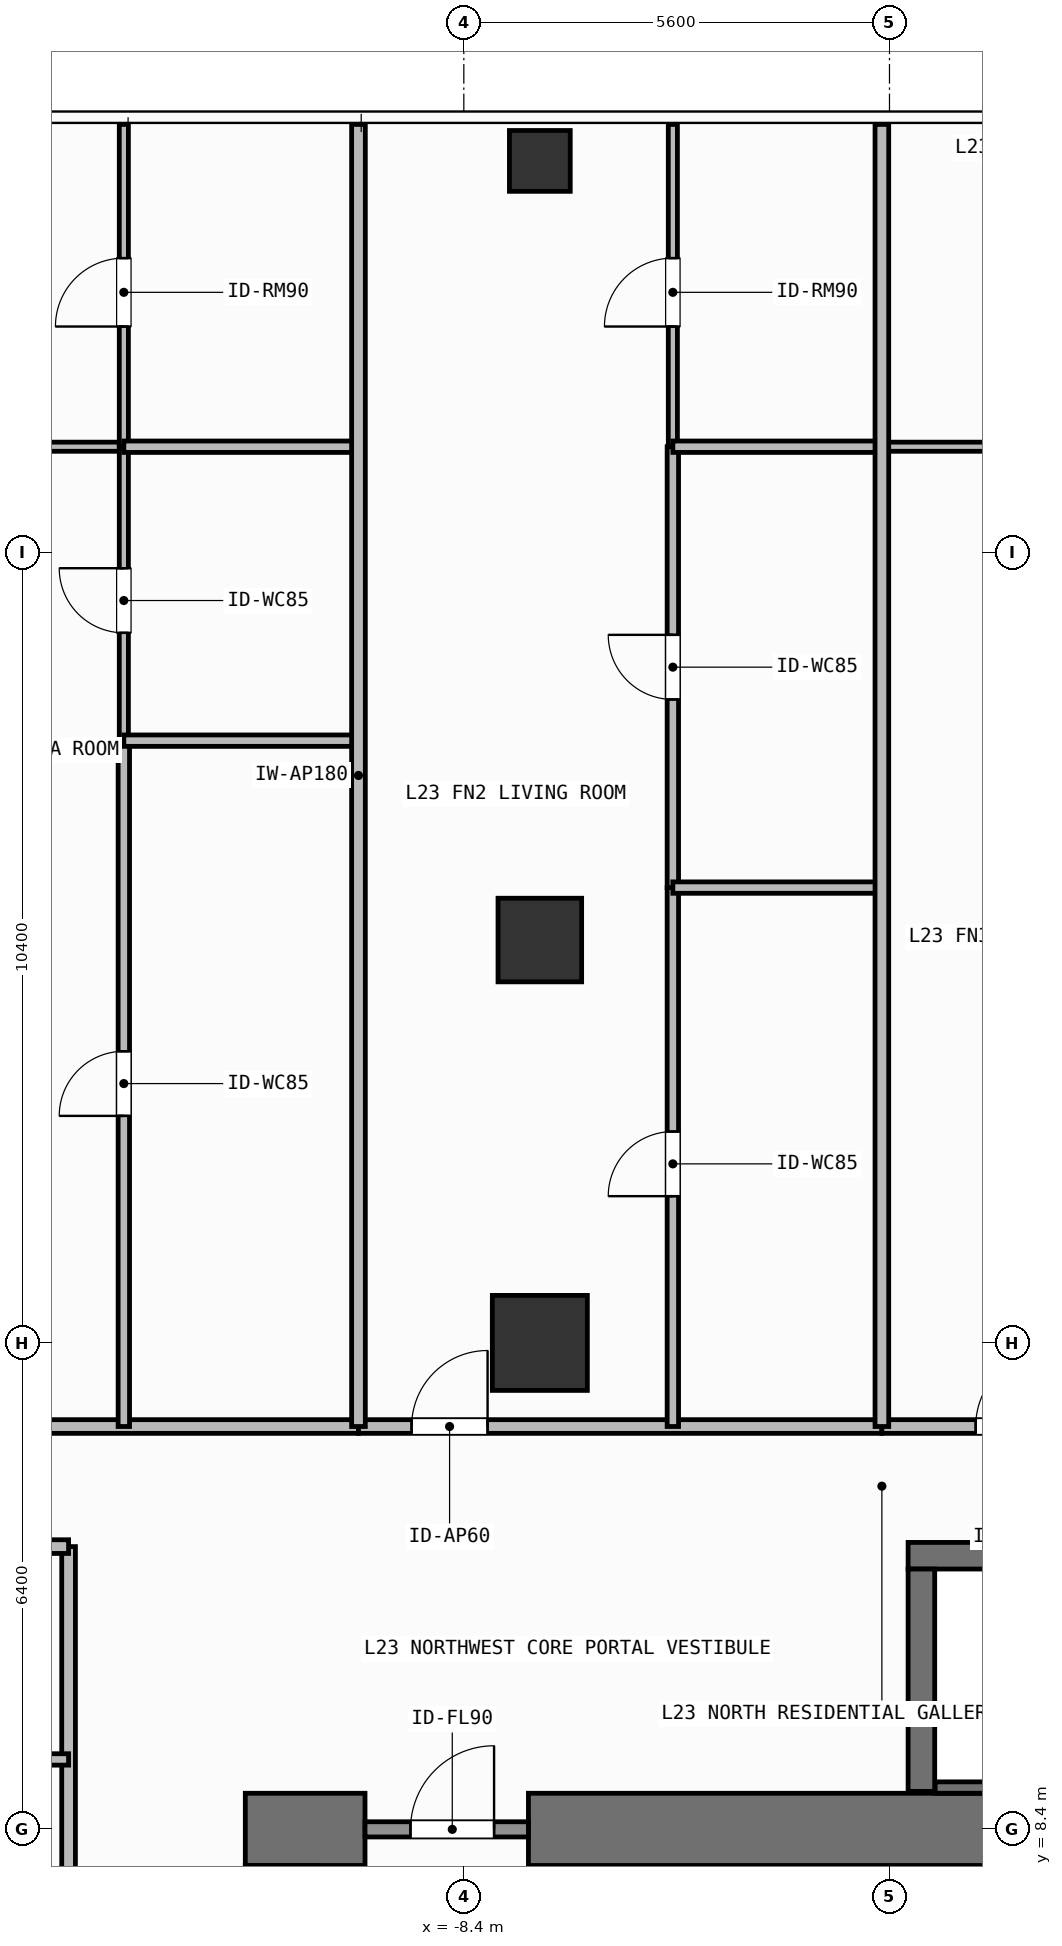
"""IFC4 building model, lengths in metres.
Left out: names, types, materials, properties, quantities, classifications, styles, units other than length and angle.
Written with IfcOpenShell. Run it as: python <this file> out.ifc"""

import sys

from ifc_helpers import new_model, si_unit, direction, frame, frame_2d, origin, origin_2d, place, context, subcontext, project, spatial, rectangle, hollow_rectangle, extrude, element, fill, save


model = new_model("IFC4")
c1 = context("Model", 3, precision=1e-05, world=origin(), true_north=direction((0.0, 1.0)))
c2 = subcontext(c1, "Body", "Model", "MODEL_VIEW")
j1 = project(units=[si_unit("LENGTHUNIT", "METRE"), si_unit("PLANEANGLEUNIT", "RADIAN")], contexts=[c1])
p1 = place(None, origin())
s1 = spatial("IfcSite", under=j1, at=p1, CompositionType="ELEMENT")
p2 = place(p1, origin())
s2 = spatial("IfcBuilding", under=s1, at=p2, CompositionType="ELEMENT")
p3 = place(p2, frame((0.0, 0.0, 93.0)))
s3 = spatial("IfcBuildingStorey", under=s2, at=p3, CompositionType="ELEMENT", Elevation=93.0)
p4 = place(p3, frame((-11.275, 8.4, 0.0), z_axis=(0.0, 0.0, 1.0), x_axis=(1.0, 0.0, 0.0)))
e1 = element("IfcWall", 1, at=p4, inside=s3, PredefinedType="SHEAR", context=c2, shape_type="SweptSolid", body=[
    extrude(rectangle(XDim=1.575, YDim=0.95, at=frame_2d((0.788, 0.0))), origin(), (0.0, 0.0, 1.0), 3.9),
])
p5 = place(p3, frame((-7.55, 8.4, 0.0), z_axis=(0.0, 0.0, 1.0), x_axis=(1.0, 0.0, 0.0)))
e2 = element("IfcWall", 2, at=p5, inside=s3, PredefinedType="SHEAR", context=c2, shape_type="SweptSolid", body=[
    extrude(rectangle(XDim=16.425, YDim=0.95, at=frame_2d((8.212, 0.0))), origin(), (0.0, 0.0, 1.0), 3.9),
])
p6 = place(p3, frame((-10.8, -7.925, 0.0), z_axis=(0.0, 0.0, 1.0), x_axis=(0.0, 1.0, 0.0)))
e3 = element("IfcWall", 3, at=p6, inside=s3, PredefinedType="SHEAR", context=c2, shape_type="SweptSolid", body=[
    extrude(rectangle(XDim=15.85, YDim=0.95, at=frame_2d((7.925, 0.0))), origin(), (0.0, 0.0, 1.0), 3.9),
])
p7 = place(p3, frame((-2.555, 12.0, 0.0), z_axis=(0.0, 0.0, 1.0), x_axis=(1.0, 0.0, 0.0)))
e4 = element("IfcWall", 4, at=p7, inside=s3, PredefinedType="SHEAR", context=c2, shape_type="SweptSolid", body=[
    extrude(rectangle(XDim=7.31, YDim=0.35, at=frame_2d((3.655, 0.0))), origin(), (0.0, 0.0, 1.0), 3.9),
])
p8 = place(p3, frame((-2.2, 8.95, 0.0), z_axis=(0.0, 0.0, 1.0), x_axis=(1.0, 0.0, 0.0)))
e5 = element("IfcWall", 5, at=p8, inside=s3, PredefinedType="SHEAR", context=c2, shape_type="SweptSolid", body=[
    extrude(rectangle(XDim=6.6, YDim=0.15, at=frame_2d((3.3, 0.0))), origin(), (0.0, 0.0, 1.0), 3.9),
])
p9 = place(p3, frame((-2.38, 8.9, 0.0), z_axis=(0.0, 0.0, 1.0), x_axis=(0.0, 1.0, 0.0)))
e6 = element("IfcWall", 6, at=p9, inside=s3, PredefinedType="SHEAR", context=c2, shape_type="SweptSolid", body=[
    extrude(rectangle(XDim=2.925, YDim=0.35, at=frame_2d((1.462, 0.0))), origin(), (0.0, 0.0, 1.0), 3.9),
])
p10 = place(p3, frame((-7.4, 14.8, 0.0), z_axis=(0.0, 0.0, 1.0), x_axis=(1.0, 0.0, 0.0)))
e7 = element("IfcColumn", 7, at=p10, inside=s3, PredefinedType="COLUMN", context=c2, shape_type="SweptSolid", body=[
    extrude(rectangle(XDim=1.25, YDim=1.25, at=origin_2d()), origin(), (0.0, 0.0, 1.0), 3.9),
])
p11 = place(p3, frame((-7.4, 20.1, 0.0), z_axis=(0.0, 0.0, 1.0), x_axis=(1.0, 0.0, 0.0)))
e8 = element("IfcColumn", 8, at=p11, inside=s3, PredefinedType="COLUMN", context=c2, shape_type="SweptSolid", body=[
    extrude(rectangle(XDim=1.1, YDim=1.1, at=origin_2d()), origin(), (0.0, 0.0, 1.0), 3.9),
])
p12 = place(p3, frame((-7.4, 30.35, 0.0), z_axis=(0.0, 0.0, 1.0), x_axis=(1.0, 0.0, 0.0)))
e9 = element("IfcColumn", 9, at=p12, inside=s3, PredefinedType="COLUMN", context=c2, shape_type="SweptSolid", body=[
    extrude(hollow_rectangle(XDim=0.8, YDim=0.8, WallThickness=0.036, at=origin_2d()), origin(), (0.0, 0.0, 1.0), 3.9),
])
p13 = place(p3, frame((-9.7, 8.4, 0.0), z_axis=(0.0, 0.0, 1.0), x_axis=(1.0, 0.0, 0.0)))
e10 = element("IfcWall", 10, at=p13, inside=s3, PredefinedType="SOLIDWALL", context=c2, shape_type="SweptSolid", body=[
    extrude(rectangle(XDim=2.15, YDim=0.2, at=frame_2d((1.075, 0.0))), origin(), (0.0, 0.0, 1.0), 2.72),
])
p14 = place(p13, frame((0.598, 0.0, 0.0)))
e11 = element("IfcOpeningElement", 11, at=p14, cuts=e10, PredefinedType="OPENING", context=c2, shape_type="SweptSolid", body=[
    extrude(rectangle(XDim=1.1, YDim=2.15, at=frame_2d((0.55, 1.075))), frame((0.0, 0.11, 0.0), z_axis=(0.0, -1.0, 0.0), x_axis=(1.0, 0.0, 0.0)), (0.0, 0.0, 1.0), 0.22),
])
p15 = place(p3, frame((-24.42, 13.7, 0.0), z_axis=(0.0, 0.0, 1.0), x_axis=(1.0, 0.0, 0.0)))
e12 = element("IfcWall", 12, at=p15, inside=s3, PredefinedType="PARTITIONING", context=c2, shape_type="SweptSolid", body=[
    extrude(rectangle(XDim=14.634, YDim=0.18, at=frame_2d((7.317, 0.0))), origin(), (0.0, 0.0, 1.0), 3.68),
])
p16 = place(p15, frame((6.457, 0.0, 0.0)))
e13 = element("IfcOpeningElement", 13, at=p16, cuts=e12, PredefinedType="OPENING", context=c2, shape_type="SweptSolid", body=[
    extrude(rectangle(XDim=1.0, YDim=2.2, at=frame_2d((0.5, 1.1))), frame((0.0, 0.1, 0.0), z_axis=(0.0, -1.0, 0.0), x_axis=(1.0, 0.0, 0.0)), (0.0, 0.0, 1.0), 0.2),
])
p17 = place(p3, frame((-16.826, 26.59, 0.0), z_axis=(0.0, 0.0, 1.0), x_axis=(1.0, 0.0, 0.0)))
e14 = element("IfcWall", 14, at=p17, inside=s3, PredefinedType="PARTITIONING", context=c2, shape_type="SweptSolid", body=[
    extrude(rectangle(XDim=3.953, YDim=0.12, at=frame_2d((1.977, 0.0))), origin(), (0.0, 0.0, 1.0), 3.68),
])
p18 = place(p17, frame((1.527, 0.0, 0.0)))
e15 = element("IfcOpeningElement", 15, at=p18, cuts=e14, PredefinedType="OPENING", context=c2, shape_type="SweptSolid", body=[
    extrude(rectangle(XDim=0.9, YDim=2.1, at=frame_2d((0.45, 1.05))), frame((0.0, 0.07, 0.0), z_axis=(0.0, -1.0, 0.0), x_axis=(1.0, 0.0, 0.0)), (0.0, 0.0, 1.0), 0.14),
])
p19 = place(p3, frame((-12.873, 13.7, 0.0), z_axis=(0.0, 0.0, 1.0), x_axis=(0.0, 1.0, 0.0)))
e16 = element("IfcWall", 16, at=p19, inside=s3, PredefinedType="PARTITIONING", context=c2, shape_type="SweptSolid", body=[
    extrude(rectangle(XDim=9.023, YDim=0.15, at=frame_2d((4.511, 0.0))), origin(), (0.0, 0.0, 1.0), 3.68),
])
p20 = place(p19, frame((4.086, 0.0, 0.0)))
e17 = element("IfcOpeningElement", 17, at=p20, cuts=e16, PredefinedType="OPENING", context=c2, shape_type="SweptSolid", body=[
    extrude(rectangle(XDim=0.85, YDim=2.1, at=frame_2d((0.425, 1.05))), frame((0.0, 0.085, 0.0), z_axis=(0.0, -1.0, 0.0), x_axis=(1.0, 0.0, 0.0)), (0.0, 0.0, 1.0), 0.17),
])
p21 = place(p3, frame((-12.873, 22.723, 0.0), z_axis=(0.0, 0.0, 1.0), x_axis=(0.0, 1.0, 0.0)))
e18 = element("IfcWall", 18, at=p21, inside=s3, PredefinedType="PARTITIONING", context=c2, shape_type="SweptSolid", body=[
    extrude(rectangle(XDim=3.867, YDim=0.12, at=frame_2d((1.934, 0.0))), origin(), (0.0, 0.0, 1.0), 3.68),
])
p22 = place(p21, frame((1.419, 0.0, 0.0)))
e19 = element("IfcOpeningElement", 19, at=p22, cuts=e18, PredefinedType="OPENING", context=c2, shape_type="SweptSolid", body=[
    extrude(rectangle(XDim=0.85, YDim=2.1, at=frame_2d((0.425, 1.05))), frame((0.0, 0.07, 0.0), z_axis=(0.0, -1.0, 0.0), x_axis=(1.0, 0.0, 0.0)), (0.0, 0.0, 1.0), 0.14),
])
p23 = place(p3, frame((-12.873, 26.59, 0.0), z_axis=(0.0, 0.0, 1.0), x_axis=(0.0, 1.0, 0.0)))
e20 = element("IfcWall", 20, at=p23, inside=s3, PredefinedType="PARTITIONING", context=c2, shape_type="SweptSolid", body=[
    extrude(rectangle(XDim=4.24, YDim=0.12, at=frame_2d((2.12, 0.0))), origin(), (0.0, 0.0, 1.0), 3.68),
])
p24 = place(p23, frame((1.581, 0.0, 0.0)))
e21 = element("IfcOpeningElement", 21, at=p24, cuts=e20, PredefinedType="OPENING", context=c2, shape_type="SweptSolid", body=[
    extrude(rectangle(XDim=0.9, YDim=2.1, at=frame_2d((0.45, 1.05))), frame((0.0, 0.07, 0.0), z_axis=(0.0, -1.0, 0.0), x_axis=(1.0, 0.0, 0.0)), (0.0, 0.0, 1.0), 0.14),
])
p25 = place(p3, frame((-9.786, 13.7, 0.0), z_axis=(0.0, 0.0, 1.0), x_axis=(1.0, 0.0, 0.0)))
e22 = element("IfcWall", 22, at=p25, inside=s3, PredefinedType="PARTITIONING", context=c2, shape_type="SweptSolid", body=[
    extrude(rectangle(XDim=6.886, YDim=0.18, at=frame_2d((3.443, 0.0))), origin(), (0.0, 0.0, 1.0), 3.68),
])
p26 = place(p25, frame((0.698, 0.0, 0.0)))
e23 = element("IfcOpeningElement", 23, at=p26, cuts=e22, PredefinedType="OPENING", context=c2, shape_type="SweptSolid", body=[
    extrude(rectangle(XDim=1.0, YDim=2.2, at=frame_2d((0.5, 1.1))), frame((0.0, 0.1, 0.0), z_axis=(0.0, -1.0, 0.0), x_axis=(1.0, 0.0, 0.0)), (0.0, 0.0, 1.0), 0.2),
])
p27 = place(p3, frame((-5.65, 13.7, 0.0), z_axis=(0.0, 0.0, 1.0), x_axis=(0.0, 1.0, 0.0)))
e24 = element("IfcWall", 24, at=p27, inside=s3, PredefinedType="PARTITIONING", context=c2, shape_type="SweptSolid", body=[
    extrude(rectangle(XDim=7.09, YDim=0.15, at=frame_2d((3.545, 0.0))), origin(), (0.0, 0.0, 1.0), 3.68),
])
p28 = place(p27, frame((3.03, 0.0, 0.0)))
e25 = element("IfcOpeningElement", 25, at=p28, cuts=e24, PredefinedType="OPENING", context=c2, shape_type="SweptSolid", body=[
    extrude(rectangle(XDim=0.85, YDim=2.1, at=frame_2d((0.425, 1.05))), frame((0.0, 0.085, 0.0), z_axis=(0.0, -1.0, 0.0), x_axis=(1.0, 0.0, 0.0)), (0.0, 0.0, 1.0), 0.17),
])
p29 = place(p3, frame((-5.65, 20.79, 0.0), z_axis=(0.0, 0.0, 1.0), x_axis=(0.0, 1.0, 0.0)))
e26 = element("IfcWall", 26, at=p29, inside=s3, PredefinedType="PARTITIONING", context=c2, shape_type="SweptSolid", body=[
    extrude(rectangle(XDim=5.8, YDim=0.15, at=frame_2d((2.9, 0.0))), origin(), (0.0, 0.0, 1.0), 3.68),
])
p30 = place(p29, frame((2.475, 0.0, 0.0)))
e27 = element("IfcOpeningElement", 27, at=p30, cuts=e26, PredefinedType="OPENING", context=c2, shape_type="SweptSolid", body=[
    extrude(rectangle(XDim=0.85, YDim=2.1, at=frame_2d((0.425, 1.05))), frame((0.0, 0.085, 0.0), z_axis=(0.0, -1.0, 0.0), x_axis=(1.0, 0.0, 0.0)), (0.0, 0.0, 1.0), 0.17),
])
p31 = place(p3, frame((-5.65, 26.59, 0.0), z_axis=(0.0, 0.0, 1.0), x_axis=(0.0, 1.0, 0.0)))
e28 = element("IfcWall", 28, at=p31, inside=s3, PredefinedType="PARTITIONING", context=c2, shape_type="SweptSolid", body=[
    extrude(rectangle(XDim=4.24, YDim=0.12, at=frame_2d((2.12, 0.0))), origin(), (0.0, 0.0, 1.0), 3.68),
])
p32 = place(p31, frame((1.581, 0.0, 0.0)))
e29 = element("IfcOpeningElement", 29, at=p32, cuts=e28, PredefinedType="OPENING", context=c2, shape_type="SweptSolid", body=[
    extrude(rectangle(XDim=0.9, YDim=2.1, at=frame_2d((0.45, 1.05))), frame((0.0, 0.07, 0.0), z_axis=(0.0, -1.0, 0.0), x_axis=(1.0, 0.0, 0.0)), (0.0, 0.0, 1.0), 0.14),
])
p33 = place(p3, frame((-2.9, 13.7, 0.0), z_axis=(0.0, 0.0, 1.0), x_axis=(1.0, 0.0, 0.0)))
e30 = element("IfcWall", 30, at=p33, inside=s3, PredefinedType="PARTITIONING", context=c2, shape_type="SweptSolid", body=[
    extrude(rectangle(XDim=9.017, YDim=0.18, at=frame_2d((4.508, 0.0))), origin(), (0.0, 0.0, 1.0), 3.68),
])
p34 = place(p33, frame((1.234, 0.0, 0.0)))
e31 = element("IfcOpeningElement", 31, at=p34, cuts=e30, PredefinedType="OPENING", context=c2, shape_type="SweptSolid", body=[
    extrude(rectangle(XDim=1.0, YDim=2.2, at=frame_2d((0.5, 1.1))), frame((0.0, 0.1, 0.0), z_axis=(0.0, -1.0, 0.0), x_axis=(1.0, 0.0, 0.0)), (0.0, 0.0, 1.0), 0.2),
])
p35 = place(p3, frame((-2.9, 26.59, 0.0), z_axis=(0.0, 0.0, 1.0), x_axis=(1.0, 0.0, 0.0)))
e32 = element("IfcWall", 32, at=p35, inside=s3, PredefinedType="PARTITIONING", context=c2, shape_type="SweptSolid", body=[
    extrude(rectangle(XDim=4.828, YDim=0.12, at=frame_2d((2.414, 0.0))), origin(), (0.0, 0.0, 1.0), 3.68),
])
p36 = place(p35, frame((1.878, 0.0, 0.0)))
e33 = element("IfcOpeningElement", 33, at=p36, cuts=e32, PredefinedType="OPENING", context=c2, shape_type="SweptSolid", body=[
    extrude(rectangle(XDim=0.9, YDim=2.1, at=frame_2d((0.45, 1.05))), frame((0.0, 0.07, 0.0), z_axis=(0.0, -1.0, 0.0), x_axis=(1.0, 0.0, 0.0)), (0.0, 0.0, 1.0), 0.14),
])
p37 = place(p3, frame((-13.6, 4.04, 0.0), z_axis=(0.0, 0.0, 1.0), x_axis=(0.0, 1.0, 0.0)))
e34 = element("IfcWall", 34, at=p37, inside=s3, PredefinedType="PARTITIONING", context=c2, shape_type="SweptSolid", body=[
    extrude(rectangle(XDim=8.08, YDim=0.18, at=frame_2d((4.04, 0.0))), origin(), (0.0, 0.0, 1.0), 3.68),
])
p38 = place(p37, frame((1.583, 0.0, 0.0)))
e35 = element("IfcOpeningElement", 35, at=p38, cuts=e34, PredefinedType="OPENING", context=c2, shape_type="SweptSolid", body=[
    extrude(rectangle(XDim=1.0, YDim=2.2, at=frame_2d((0.5, 1.1))), frame((0.0, 0.1, 0.0), z_axis=(0.0, -1.0, 0.0), x_axis=(1.0, 0.0, 0.0)), (0.0, 0.0, 1.0), 0.2),
])
p39 = place(p3, frame((-16.902, 9.32, 0.0), z_axis=(0.0, 0.0, 1.0), x_axis=(1.0, 0.0, 0.0)))
e36 = element("IfcWall", 36, at=p39, inside=s3, PredefinedType="PARTITIONING", context=c2, shape_type="SweptSolid", body=[
    extrude(rectangle(XDim=3.302, YDim=0.15, at=frame_2d((1.651, 0.0))), origin(), (0.0, 0.0, 1.0), 3.68),
])
p40 = place(p39, frame((0.515, 0.0, 0.0)))
e37 = element("IfcOpeningElement", 37, at=p40, cuts=e36, PredefinedType="OPENING", context=c2, shape_type="SweptSolid", body=[
    extrude(rectangle(XDim=0.85, YDim=2.1, at=frame_2d((0.425, 1.05))), frame((0.0, 0.085, 0.0), z_axis=(0.0, -1.0, 0.0), x_axis=(1.0, 0.0, 0.0)), (0.0, 0.0, 1.0), 0.17),
])
for number, where, z_axis, x_axis in (
    (38, (-12.873, 22.723, 0.0), (0.0, 0.0, 1.0), (1.0, 0.0, 0.0)),
    (39, (-12.873, 26.59, 0.0), (0.0, 0.0, 1.0), (1.0, 0.0, 0.0)),
):
    element("IfcWall", number, at=place(p3, frame(where, z_axis=z_axis, x_axis=x_axis)), inside=s3, PredefinedType="PARTITIONING", context=c2, shape_type="SweptSolid", body=[
        extrude(rectangle(XDim=3.087, YDim=0.15, at=frame_2d((1.543, 0.0))), origin(), (0.0, 0.0, 1.0), 3.68),
    ])
for number, where, z_axis, x_axis in (
    (40, (-5.65, 20.79, 0.0), (0.0, 0.0, 1.0), (1.0, 0.0, 0.0)),
    (41, (-5.65, 26.59, 0.0), (0.0, 0.0, 1.0), (1.0, 0.0, 0.0)),
):
    element("IfcWall", number, at=place(p3, frame(where, z_axis=z_axis, x_axis=x_axis)), inside=s3, PredefinedType="PARTITIONING", context=c2, shape_type="SweptSolid", body=[
        extrude(rectangle(XDim=2.75, YDim=0.15, at=frame_2d((1.375, 0.0))), origin(), (0.0, 0.0, 1.0), 3.68),
    ])
for number, where, z_axis, x_axis in (
    (42, (-9.786, 13.7, 0.0), (0.0, 0.0, 1.0), (0.0, 1.0, 0.0)),
    (43, (-2.9, 13.7, 0.0), (0.0, 0.0, 1.0), (0.0, 1.0, 0.0)),
):
    element("IfcWall", number, at=place(p3, frame(where, z_axis=z_axis, x_axis=x_axis)), inside=s3, PredefinedType="PARTITIONING", context=c2, shape_type="SweptSolid", body=[
        extrude(rectangle(XDim=17.13, YDim=0.18, at=frame_2d((8.565, 0.0))), origin(), (0.0, 0.0, 1.0), 3.68),
    ])
p41 = place(p3, frame((-27.93, 12.12, 0.0), z_axis=(0.0, 0.0, 1.0), x_axis=(1.0, 0.0, 0.0)))
e44 = element("IfcWall", 44, at=p41, inside=s3, PredefinedType="PARTITIONING", context=c2, shape_type="SweptSolid", body=[
    extrude(rectangle(XDim=14.33, YDim=0.18, at=frame_2d((7.165, 0.0))), origin(), (0.0, 0.0, 1.0), 3.68),
])
p42 = place(p14, origin())
e45 = element("IfcDoor", 45, at=p42, inside=s3, OperationType="SINGLE_SWING_RIGHT", PredefinedType="DOOR", context=c2, shape_type="SweptSolid", body=[
    extrude(rectangle(XDim=1.1, YDim=2.15, at=frame_2d((0.55, 1.075))), frame((0.0, 0.025, 0.0), z_axis=(0.0, -1.0, 0.0), x_axis=(1.0, 0.0, 0.0)), (0.0, 0.0, 1.0), 0.05),
])
fill(e11, e45)
p43 = place(p20, origin())
e46 = element("IfcDoor", 46, at=p43, inside=s3, OperationType="SINGLE_SWING_LEFT", PredefinedType="DOOR", context=c2, shape_type="SweptSolid", body=[
    extrude(rectangle(XDim=0.85, YDim=2.1, at=frame_2d((0.425, 1.05))), frame((0.0, 0.025, 0.0), z_axis=(0.0, -1.0, 0.0), x_axis=(1.0, 0.0, 0.0)), (0.0, 0.0, 1.0), 0.05),
])
fill(e17, e46)
p44 = place(p22, origin())
e47 = element("IfcDoor", 47, at=p44, inside=s3, OperationType="SINGLE_SWING_RIGHT", PredefinedType="DOOR", context=c2, shape_type="SweptSolid", body=[
    extrude(rectangle(XDim=0.85, YDim=2.1, at=frame_2d((0.425, 1.05))), frame((0.0, 0.025, 0.0), z_axis=(0.0, -1.0, 0.0), x_axis=(1.0, 0.0, 0.0)), (0.0, 0.0, 1.0), 0.05),
])
fill(e19, e47)
p45 = place(p24, origin())
e48 = element("IfcDoor", 48, at=p45, inside=s3, OperationType="SINGLE_SWING_LEFT", PredefinedType="DOOR", context=c2, shape_type="SweptSolid", body=[
    extrude(rectangle(XDim=0.9, YDim=2.1, at=frame_2d((0.45, 1.05))), frame((0.0, 0.025, 0.0), z_axis=(0.0, -1.0, 0.0), x_axis=(1.0, 0.0, 0.0)), (0.0, 0.0, 1.0), 0.05),
])
fill(e21, e48)
p46 = place(p26, origin())
e49 = element("IfcDoor", 49, at=p46, inside=s3, OperationType="SINGLE_SWING_RIGHT", PredefinedType="DOOR", context=c2, shape_type="SweptSolid", body=[
    extrude(rectangle(XDim=1.0, YDim=2.2, at=frame_2d((0.5, 1.1))), frame((0.0, 0.025, 0.0), z_axis=(0.0, -1.0, 0.0), x_axis=(1.0, 0.0, 0.0)), (0.0, 0.0, 1.0), 0.05),
])
fill(e23, e49)
p47 = place(p28, origin())
e50 = element("IfcDoor", 50, at=p47, inside=s3, OperationType="SINGLE_SWING_LEFT", PredefinedType="DOOR", context=c2, shape_type="SweptSolid", body=[
    extrude(rectangle(XDim=0.85, YDim=2.1, at=frame_2d((0.425, 1.05))), frame((0.0, 0.025, 0.0), z_axis=(0.0, -1.0, 0.0), x_axis=(1.0, 0.0, 0.0)), (0.0, 0.0, 1.0), 0.05),
])
fill(e25, e50)
p48 = place(p30, origin())
e51 = element("IfcDoor", 51, at=p48, inside=s3, OperationType="SINGLE_SWING_RIGHT", PredefinedType="DOOR", context=c2, shape_type="SweptSolid", body=[
    extrude(rectangle(XDim=0.85, YDim=2.1, at=frame_2d((0.425, 1.05))), frame((0.0, 0.025, 0.0), z_axis=(0.0, -1.0, 0.0), x_axis=(1.0, 0.0, 0.0)), (0.0, 0.0, 1.0), 0.05),
])
fill(e27, e51)
p49 = place(p32, origin())
e52 = element("IfcDoor", 52, at=p49, inside=s3, OperationType="SINGLE_SWING_LEFT", PredefinedType="DOOR", context=c2, shape_type="SweptSolid", body=[
    extrude(rectangle(XDim=0.9, YDim=2.1, at=frame_2d((0.45, 1.05))), frame((0.0, 0.025, 0.0), z_axis=(0.0, -1.0, 0.0), x_axis=(1.0, 0.0, 0.0)), (0.0, 0.0, 1.0), 0.05),
])
fill(e29, e52)
p50 = place(p34, origin())
e53 = element("IfcDoor", 53, at=p50, inside=s3, OperationType="SINGLE_SWING_RIGHT", PredefinedType="DOOR", context=c2, shape_type="SweptSolid", body=[
    extrude(rectangle(XDim=1.0, YDim=2.2, at=frame_2d((0.5, 1.1))), frame((0.0, 0.025, 0.0), z_axis=(0.0, -1.0, 0.0), x_axis=(1.0, 0.0, 0.0)), (0.0, 0.0, 1.0), 0.05),
])
fill(e31, e53)
save(model, sys.argv[1])
